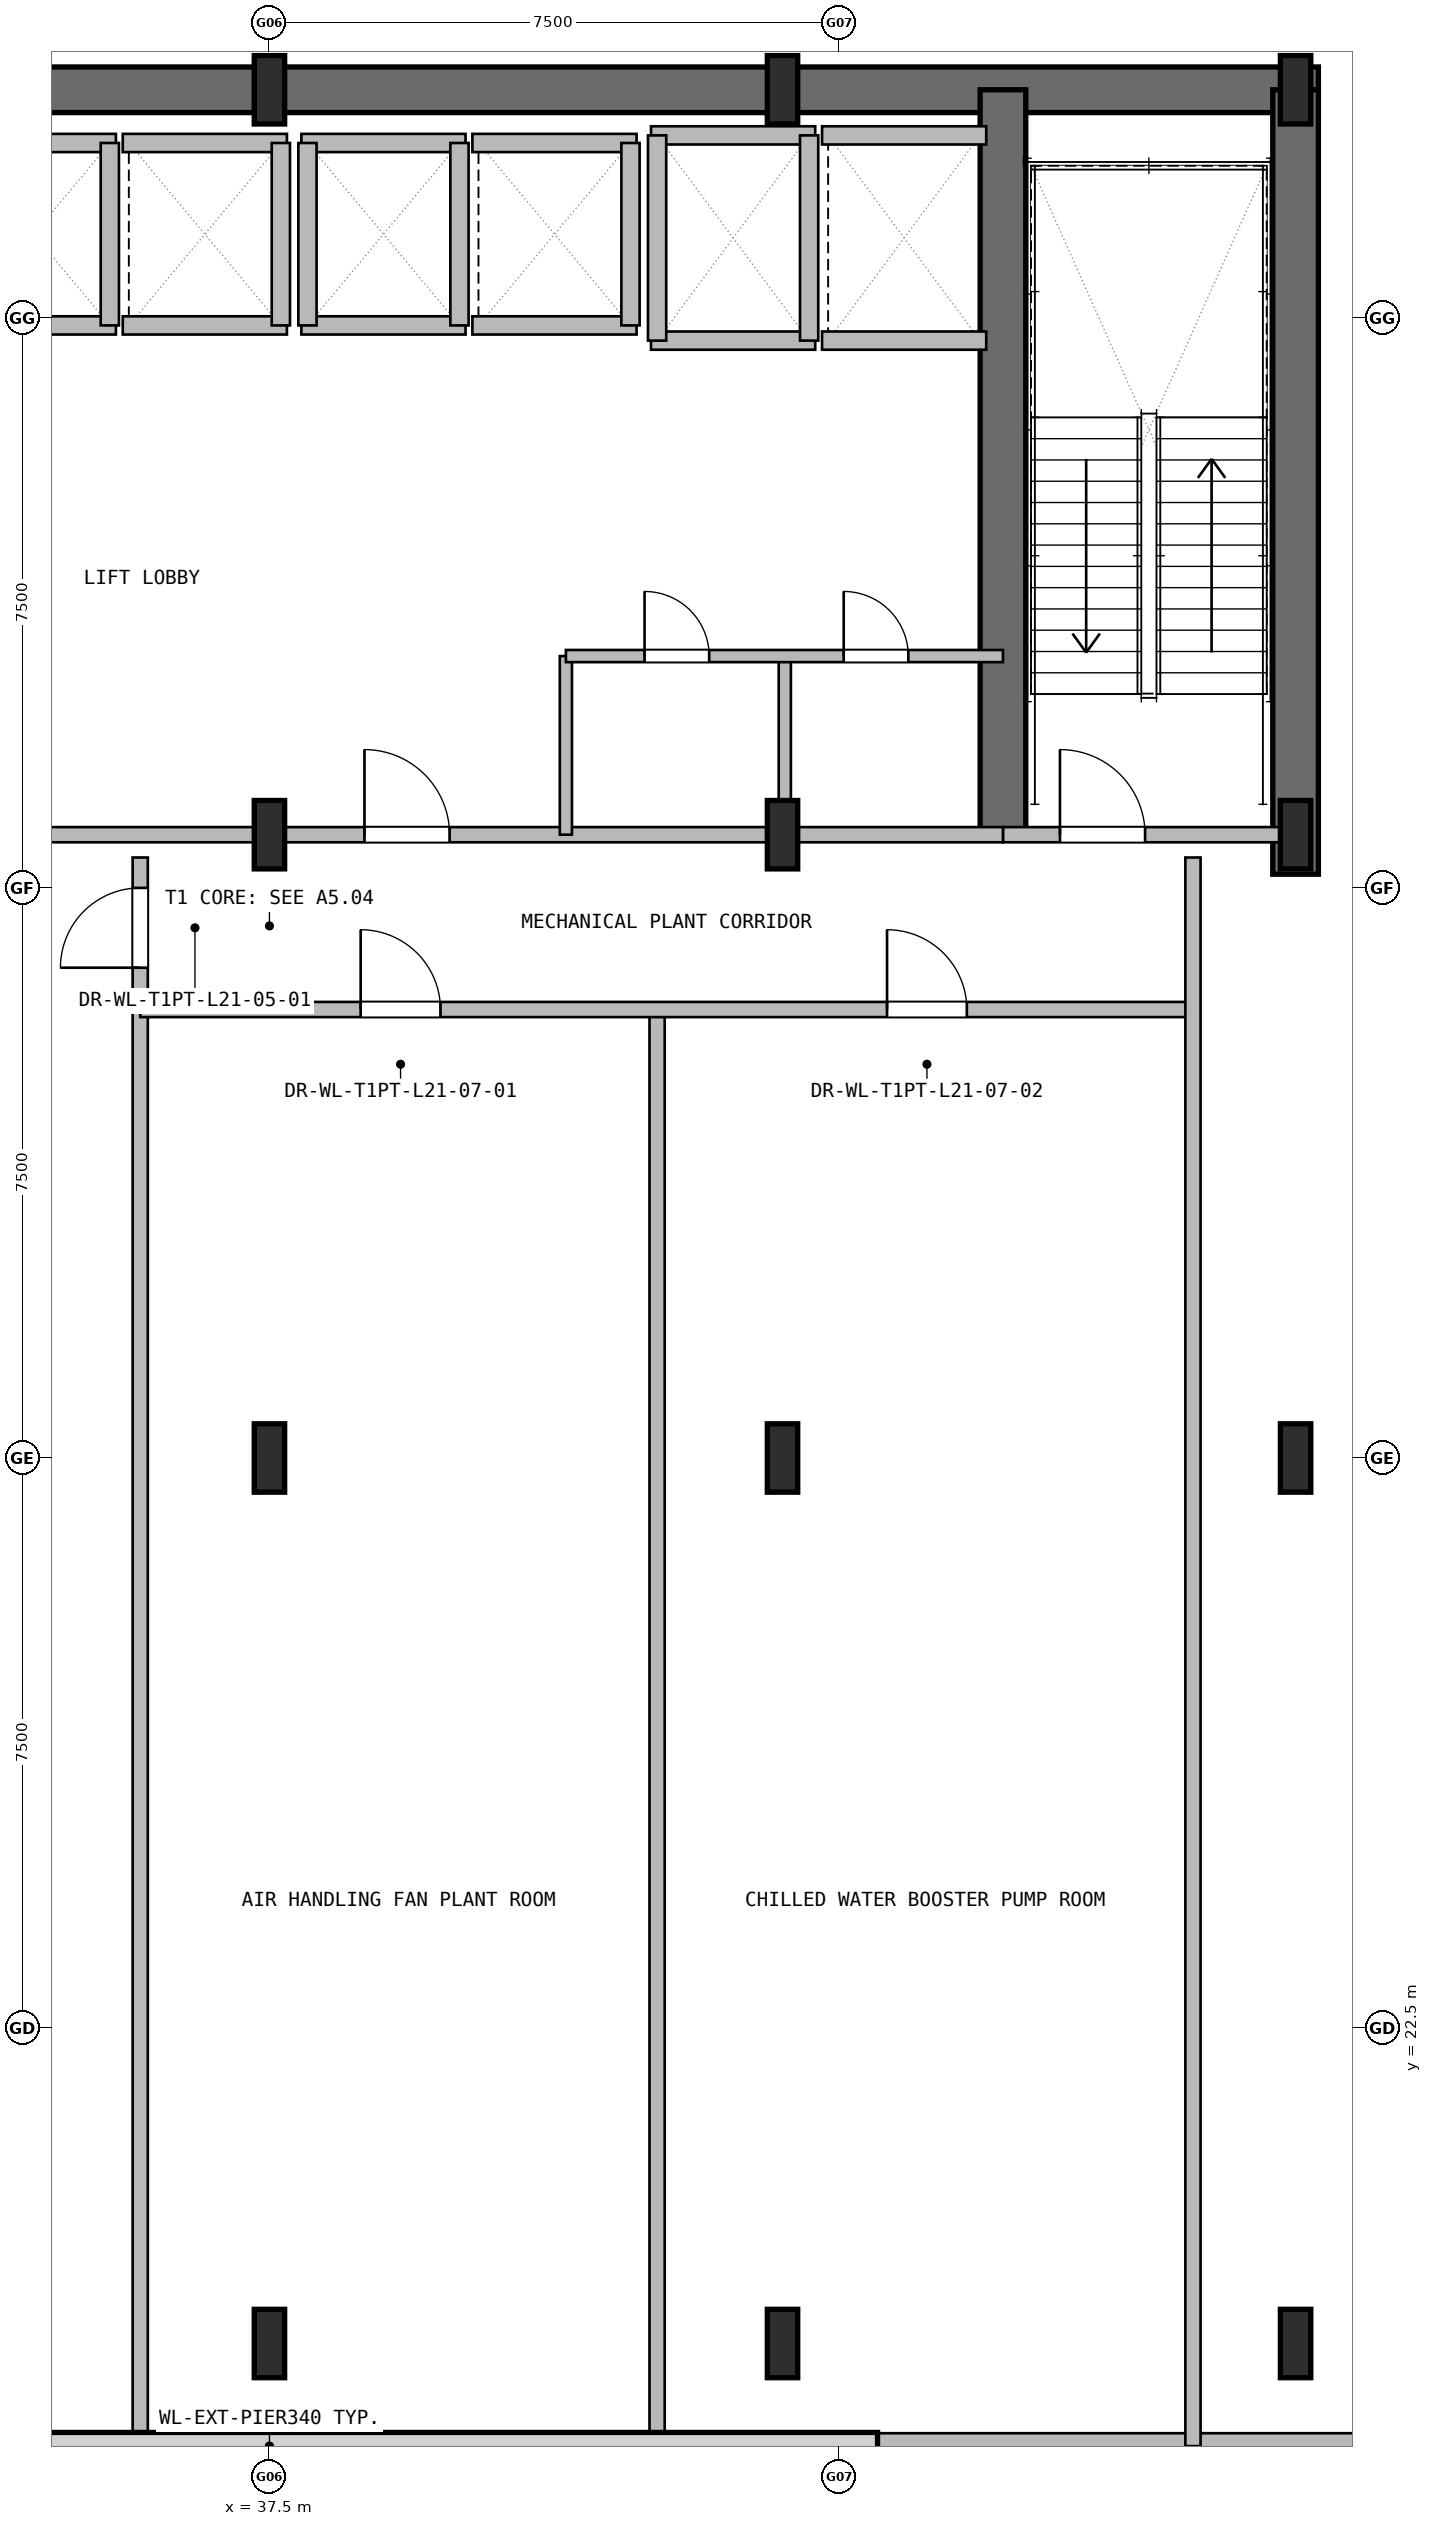
"""IFC4 building model, lengths in metres.
Left out: names, types, materials, properties, quantities, classifications, styles, units other than length and angle.
Written with IfcOpenShell. Run it as: python <this file> out.ifc"""

import sys

from ifc_helpers import new_model, si_unit, direction, frame, frame_2d, origin, origin_2d, place, context, subcontext, project, spatial, rectangle, i_section, extrude, element, fill, save


model = new_model("IFC4")
c1 = context("Model", 3, precision=1e-05, world=origin(), true_north=direction((0.0, 1.0)))
c2 = subcontext(c1, "Body", "Model", "MODEL_VIEW")
j1 = project(units=[si_unit("LENGTHUNIT", "METRE"), si_unit("PLANEANGLEUNIT", "RADIAN")], contexts=[c1])
p1 = place(None, origin())
s1 = spatial("IfcSite", under=j1, at=p1, CompositionType="ELEMENT")
p2 = place(p1, origin())
s2 = spatial("IfcBuilding", under=s1, at=p2, CompositionType="ELEMENT")
p3 = place(p2, frame((0.0, 0.0, 81.9)))
s3 = spatial("IfcBuildingStorey", under=s2, at=p3, CompositionType="ELEMENT", Elevation=81.9)
p4 = place(p3, frame((23.7, 48.0, 0.0), z_axis=(0.0, 0.0, 1.0), x_axis=(1.0, 0.0, 0.0)))
e1 = element("IfcWall", 1, at=p4, inside=s3, PredefinedType="SHEAR", context=c2, shape_type="SweptSolid", body=[
    extrude(rectangle(XDim=27.6, YDim=0.6, at=frame_2d((13.8, 0.0))), origin(), (0.0, 0.0, 1.0), 4.8),
])
p5 = place(p3, frame((51.0, 37.68, 0.0), z_axis=(0.0, 0.0, 1.0), x_axis=(0.0, 1.0, 0.0)))
e2 = element("IfcWall", 2, at=p5, inside=s3, PredefinedType="SHEAR", context=c2, shape_type="SweptSolid", body=[
    extrude(rectangle(XDim=10.32, YDim=0.6, at=frame_2d((5.16, 0.0))), origin(), (0.0, 0.0, 1.0), 4.8),
])
p6 = place(p3, frame((47.15, 38.2, 0.0), z_axis=(0.0, 0.0, 1.0), x_axis=(0.0, 1.0, 0.0)))
e3 = element("IfcWall", 3, at=p6, inside=s3, PredefinedType="SHEAR", context=c2, shape_type="SweptSolid", body=[
    extrude(rectangle(XDim=9.8, YDim=0.6, at=frame_2d((4.9, 0.0))), origin(), (0.0, 0.0, 1.0), 4.8),
])
for number, where, z_axis, x_axis in (
    (4, (37.5, 18.35, 0.0), (0.0, 0.0, 1.0), (1.0, 0.0, 0.0)),
    (5, (37.5, 30.0, 0.0), (0.0, 0.0, 1.0), (1.0, 0.0, 0.0)),
    (6, (37.5, 38.2, 0.0), (0.0, 0.0, 1.0), (1.0, 0.0, 0.0)),
    (7, (37.5, 48.0, 0.0), (0.0, 0.0, 1.0), (1.0, 0.0, 0.0)),
    (8, (44.25, 18.35, 0.0), (0.0, 0.0, 1.0), (1.0, 0.0, 0.0)),
    (9, (44.25, 30.0, 0.0), (0.0, 0.0, 1.0), (1.0, 0.0, 0.0)),
    (10, (44.25, 38.2, 0.0), (0.0, 0.0, 1.0), (1.0, 0.0, 0.0)),
    (11, (44.25, 48.0, 0.0), (0.0, 0.0, 1.0), (1.0, 0.0, 0.0)),
    (12, (51.0, 18.35, 0.0), (0.0, 0.0, 1.0), (1.0, 0.0, 0.0)),
    (13, (51.0, 30.0, 0.0), (0.0, 0.0, 1.0), (1.0, 0.0, 0.0)),
    (14, (51.0, 38.2, 0.0), (0.0, 0.0, 1.0), (1.0, 0.0, 0.0)),
    (15, (51.0, 48.0, 0.0), (0.0, 0.0, 1.0), (1.0, 0.0, 0.0)),
):
    element("IfcColumn", number, at=place(p3, frame(where, z_axis=z_axis, x_axis=x_axis)), inside=s3, PredefinedType="COLUMN", context=c2, shape_type="SweptSolid", body=[
        extrude(i_section(OverallWidth=0.4, OverallDepth=0.9, WebThickness=0.02, FlangeThickness=0.036, at=origin_2d()), origin(), (0.0, 0.0, 1.0), 4.8),
    ])
p7 = place(p3, frame((59.8, 17.0, 0.0), z_axis=(0.0, 0.0, 1.0), x_axis=(-1.0, 0.0, 0.0)))
e16 = element("IfcWall", 16, at=p7, inside=s3, PredefinedType="SOLIDWALL", context=c2, shape_type="SweptSolid", body=[
    extrude(rectangle(XDim=44.6, YDim=0.34, at=frame_2d((22.3, 0.0))), origin(), (0.0, 0.0, 1.0), 4.53),
])
p8 = place(p3, frame((47.15, 38.2, 0.0), z_axis=(0.0, 0.0, 1.0), x_axis=(1.0, 0.0, 0.0)))
e17 = element("IfcWall", 17, at=p8, inside=s3, PredefinedType="PARTITIONING", context=c2, shape_type="SweptSolid", body=[
    extrude(rectangle(XDim=3.85, YDim=0.2, at=frame_2d((1.925, 0.0))), origin(), (0.0, 0.0, 1.0), 3.83),
])
p9 = place(p8, frame((0.75, 0.0, 0.0)))
e18 = element("IfcOpeningElement", 18, at=p9, cuts=e17, PredefinedType="OPENING", context=c2, shape_type="SweptSolid", body=[
    extrude(rectangle(XDim=1.12, YDim=2.1, at=frame_2d((0.56, 1.05))), frame((0.0, 0.11, 0.0), z_axis=(0.0, -1.0, 0.0), x_axis=(1.0, 0.0, 0.0)), (0.0, 0.0, 1.0), 0.22),
])
p10 = place(p3, frame((30.8, 38.2, 0.0), z_axis=(0.0, 0.0, 1.0), x_axis=(1.0, 0.0, 0.0)))
e19 = element("IfcWall", 19, at=p10, inside=s3, PredefinedType="PARTITIONING", context=c2, shape_type="SweptSolid", body=[
    extrude(rectangle(XDim=16.35, YDim=0.2, at=frame_2d((8.175, 0.0))), origin(), (0.0, 0.0, 1.0), 3.83),
])
p11 = place(p10, frame((2.1, 0.0, 0.0)))
e20 = element("IfcOpeningElement", 20, at=p11, cuts=e19, PredefinedType="OPENING", context=c2, shape_type="SweptSolid", body=[
    extrude(rectangle(XDim=1.12, YDim=2.1, at=frame_2d((0.56, 1.05))), frame((0.0, 0.11, 0.0), z_axis=(0.0, -1.0, 0.0), x_axis=(1.0, 0.0, 0.0)), (0.0, 0.0, 1.0), 0.22),
])
p12 = place(p10, frame((7.95, 0.0, 0.0)))
e21 = element("IfcOpeningElement", 21, at=p12, cuts=e19, PredefinedType="OPENING", context=c2, shape_type="SweptSolid", body=[
    extrude(rectangle(XDim=1.12, YDim=2.1, at=frame_2d((0.56, 1.05))), frame((0.0, 0.11, 0.0), z_axis=(0.0, -1.0, 0.0), x_axis=(1.0, 0.0, 0.0)), (0.0, 0.0, 1.0), 0.22),
])
for number, where, z_axis, x_axis in (
    (22, (33.32, 44.9, 0.0), (0.0, 0.0, 1.0), (1.0, 0.0, 0.0)),
    (23, (33.32, 47.3, 0.0), (0.0, 0.0, 1.0), (1.0, 0.0, 0.0)),
):
    element("IfcWall", number, at=place(p3, frame(where, z_axis=z_axis, x_axis=x_axis)), inside=s3, PredefinedType="PARTITIONING", context=c2, shape_type="SweptSolid", body=[
        extrude(rectangle(XDim=2.16, YDim=0.24, at=frame_2d((1.08, 0.0))), origin(), (0.0, 0.0, 1.0), 4.53),
    ])
p13 = place(p3, frame((35.4, 44.9, 0.0), z_axis=(0.0, 0.0, 1.0), x_axis=(0.0, 1.0, 0.0)))
e24 = element("IfcWall", 24, at=p13, inside=s3, PredefinedType="PARTITIONING", context=c2, shape_type="SweptSolid", body=[
    extrude(rectangle(XDim=2.4, YDim=0.24, at=frame_2d((1.2, 0.0))), origin(), (0.0, 0.0, 1.0), 4.53),
])
for number, where, z_axis, x_axis in (
    (25, (35.57, 44.9, 0.0), (0.0, 0.0, 1.0), (1.0, 0.0, 0.0)),
    (26, (35.57, 47.3, 0.0), (0.0, 0.0, 1.0), (1.0, 0.0, 0.0)),
):
    element("IfcWall", number, at=place(p3, frame(where, z_axis=z_axis, x_axis=x_axis)), inside=s3, PredefinedType="PARTITIONING", context=c2, shape_type="SweptSolid", body=[
        extrude(rectangle(XDim=2.16, YDim=0.24, at=frame_2d((1.08, 0.0))), origin(), (0.0, 0.0, 1.0), 4.53),
    ])
p14 = place(p3, frame((37.65, 44.9, 0.0), z_axis=(0.0, 0.0, 1.0), x_axis=(0.0, 1.0, 0.0)))
e27 = element("IfcWall", 27, at=p14, inside=s3, PredefinedType="PARTITIONING", context=c2, shape_type="SweptSolid", body=[
    extrude(rectangle(XDim=2.4, YDim=0.24, at=frame_2d((1.2, 0.0))), origin(), (0.0, 0.0, 1.0), 4.53),
])
for number, where, z_axis, x_axis in (
    (28, (37.92, 44.9, 0.0), (0.0, 0.0, 1.0), (1.0, 0.0, 0.0)),
    (29, (37.92, 47.3, 0.0), (0.0, 0.0, 1.0), (1.0, 0.0, 0.0)),
):
    element("IfcWall", number, at=place(p3, frame(where, z_axis=z_axis, x_axis=x_axis)), inside=s3, PredefinedType="PARTITIONING", context=c2, shape_type="SweptSolid", body=[
        extrude(rectangle(XDim=2.16, YDim=0.24, at=frame_2d((1.08, 0.0))), origin(), (0.0, 0.0, 1.0), 4.53),
    ])
for number, where, z_axis, x_axis in (
    (30, (38.0, 44.9, 0.0), (0.0, 0.0, 1.0), (0.0, 1.0, 0.0)),
    (31, (40.0, 44.9, 0.0), (0.0, 0.0, 1.0), (0.0, 1.0, 0.0)),
):
    element("IfcWall", number, at=place(p3, frame(where, z_axis=z_axis, x_axis=x_axis)), inside=s3, PredefinedType="PARTITIONING", context=c2, shape_type="SweptSolid", body=[
        extrude(rectangle(XDim=2.4, YDim=0.24, at=frame_2d((1.2, 0.0))), origin(), (0.0, 0.0, 1.0), 4.53),
    ])
for number, where, z_axis, x_axis in (
    (32, (40.17, 44.9, 0.0), (0.0, 0.0, 1.0), (1.0, 0.0, 0.0)),
    (33, (40.17, 47.3, 0.0), (0.0, 0.0, 1.0), (1.0, 0.0, 0.0)),
):
    element("IfcWall", number, at=place(p3, frame(where, z_axis=z_axis, x_axis=x_axis)), inside=s3, PredefinedType="PARTITIONING", context=c2, shape_type="SweptSolid", body=[
        extrude(rectangle(XDim=2.16, YDim=0.24, at=frame_2d((1.08, 0.0))), origin(), (0.0, 0.0, 1.0), 4.53),
    ])
p15 = place(p3, frame((42.25, 44.9, 0.0), z_axis=(0.0, 0.0, 1.0), x_axis=(0.0, 1.0, 0.0)))
e34 = element("IfcWall", 34, at=p15, inside=s3, PredefinedType="PARTITIONING", context=c2, shape_type="SweptSolid", body=[
    extrude(rectangle(XDim=2.4, YDim=0.24, at=frame_2d((1.2, 0.0))), origin(), (0.0, 0.0, 1.0), 4.53),
])
for number, where, z_axis, x_axis in (
    (35, (42.52, 44.7, 0.0), (0.0, 0.0, 1.0), (1.0, 0.0, 0.0)),
    (36, (42.52, 47.4, 0.0), (0.0, 0.0, 1.0), (1.0, 0.0, 0.0)),
):
    element("IfcWall", number, at=place(p3, frame(where, z_axis=z_axis, x_axis=x_axis)), inside=s3, PredefinedType="PARTITIONING", context=c2, shape_type="SweptSolid", body=[
        extrude(rectangle(XDim=2.16, YDim=0.24, at=frame_2d((1.08, 0.0))), origin(), (0.0, 0.0, 1.0), 4.53),
    ])
for number, where, z_axis, x_axis in (
    (37, (42.6, 44.7, 0.0), (0.0, 0.0, 1.0), (0.0, 1.0, 0.0)),
    (38, (44.6, 44.7, 0.0), (0.0, 0.0, 1.0), (0.0, 1.0, 0.0)),
):
    element("IfcWall", number, at=place(p3, frame(where, z_axis=z_axis, x_axis=x_axis)), inside=s3, PredefinedType="PARTITIONING", context=c2, shape_type="SweptSolid", body=[
        extrude(rectangle(XDim=2.7, YDim=0.24, at=frame_2d((1.35, 0.0))), origin(), (0.0, 0.0, 1.0), 4.53),
    ])
for number, where, z_axis, x_axis in (
    (39, (44.77, 44.7, 0.0), (0.0, 0.0, 1.0), (1.0, 0.0, 0.0)),
    (40, (44.77, 47.4, 0.0), (0.0, 0.0, 1.0), (1.0, 0.0, 0.0)),
):
    element("IfcWall", number, at=place(p3, frame(where, z_axis=z_axis, x_axis=x_axis)), inside=s3, PredefinedType="PARTITIONING", context=c2, shape_type="SweptSolid", body=[
        extrude(rectangle(XDim=2.16, YDim=0.24, at=frame_2d((1.08, 0.0))), origin(), (0.0, 0.0, 1.0), 4.53),
    ])
for number, where, z_axis, x_axis in (
    (41, (41.4, 38.2, 0.0), (0.0, 0.0, 1.0), (0.0, 1.0, 0.0)),
    (42, (44.28, 38.2, 0.0), (0.0, 0.0, 1.0), (0.0, 1.0, 0.0)),
):
    element("IfcWall", number, at=place(p3, frame(where, z_axis=z_axis, x_axis=x_axis)), inside=s3, PredefinedType="PARTITIONING", context=c2, shape_type="SweptSolid", body=[
        extrude(rectangle(XDim=2.35, YDim=0.16, at=frame_2d((1.175, 0.0))), origin(), (0.0, 0.0, 1.0), 4.53),
    ])
p16 = place(p3, frame((41.4, 40.55, 0.0), z_axis=(0.0, 0.0, 1.0), x_axis=(1.0, 0.0, 0.0)))
e43 = element("IfcWall", 43, at=p16, inside=s3, PredefinedType="PARTITIONING", context=c2, shape_type="SweptSolid", body=[
    extrude(rectangle(XDim=5.75, YDim=0.16, at=frame_2d((2.875, 0.0))), origin(), (0.0, 0.0, 1.0), 4.53),
])
p17 = place(p16, frame((1.035, 0.0, 0.0)))
e44 = element("IfcOpeningElement", 44, at=p17, cuts=e43, PredefinedType="OPENING", context=c2, shape_type="SweptSolid", body=[
    extrude(rectangle(XDim=0.85, YDim=2.05, at=frame_2d((0.425, 1.025))), frame((0.0, 0.09, 0.0), z_axis=(0.0, -1.0, 0.0), x_axis=(1.0, 0.0, 0.0)), (0.0, 0.0, 1.0), 0.18),
])
p18 = place(p16, frame((3.655, 0.0, 0.0)))
e45 = element("IfcOpeningElement", 45, at=p18, cuts=e43, PredefinedType="OPENING", context=c2, shape_type="SweptSolid", body=[
    extrude(rectangle(XDim=0.85, YDim=2.05, at=frame_2d((0.425, 1.025))), frame((0.0, 0.09, 0.0), z_axis=(0.0, -1.0, 0.0), x_axis=(1.0, 0.0, 0.0)), (0.0, 0.0, 1.0), 0.18),
])
p19 = place(p3, frame((35.8, 17.0, 0.0), z_axis=(0.0, 0.0, 1.0), x_axis=(0.0, 1.0, 0.0)))
e46 = element("IfcWall", 46, at=p19, inside=s3, PredefinedType="PARTITIONING", context=c2, shape_type="SweptSolid", body=[
    extrude(rectangle(XDim=20.9, YDim=0.2, at=frame_2d((10.45, 0.0))), origin(), (0.0, 0.0, 1.0), 4.53),
])
p20 = place(p19, frame((19.45, 0.0, 0.0)))
e47 = element("IfcOpeningElement", 47, at=p20, cuts=e46, PredefinedType="OPENING", context=c2, shape_type="SweptSolid", body=[
    extrude(rectangle(XDim=1.05, YDim=2.1, at=frame_2d((0.525, 1.05))), frame((0.0, 0.11, 0.0), z_axis=(0.0, -1.0, 0.0), x_axis=(1.0, 0.0, 0.0)), (0.0, 0.0, 1.0), 0.22),
])
p21 = place(p3, frame((42.6, 17.0, 0.0), z_axis=(0.0, 0.0, 1.0), x_axis=(0.0, 1.0, 0.0)))
e48 = element("IfcWall", 48, at=p21, inside=s3, PredefinedType="PARTITIONING", context=c2, shape_type="SweptSolid", body=[
    extrude(rectangle(XDim=18.9, YDim=0.2, at=frame_2d((9.45, 0.0))), origin(), (0.0, 0.0, 1.0), 4.53),
])
p22 = place(p3, frame((35.8, 35.9, 0.0), z_axis=(0.0, 0.0, 1.0), x_axis=(1.0, 0.0, 0.0)))
e49 = element("IfcWall", 49, at=p22, inside=s3, PredefinedType="PARTITIONING", context=c2, shape_type="SweptSolid", body=[
    extrude(rectangle(XDim=13.85, YDim=0.2, at=frame_2d((6.925, 0.0))), origin(), (0.0, 0.0, 1.0), 4.53),
])
p23 = place(p22, frame((2.9, 0.0, 0.0)))
e50 = element("IfcOpeningElement", 50, at=p23, cuts=e49, PredefinedType="OPENING", context=c2, shape_type="SweptSolid", body=[
    extrude(rectangle(XDim=1.05, YDim=2.1, at=frame_2d((0.525, 1.05))), frame((0.0, 0.11, 0.0), z_axis=(0.0, -1.0, 0.0), x_axis=(1.0, 0.0, 0.0)), (0.0, 0.0, 1.0), 0.22),
])
p24 = place(p22, frame((9.825, 0.0, 0.0)))
e51 = element("IfcOpeningElement", 51, at=p24, cuts=e49, PredefinedType="OPENING", context=c2, shape_type="SweptSolid", body=[
    extrude(rectangle(XDim=1.05, YDim=2.1, at=frame_2d((0.525, 1.05))), frame((0.0, 0.11, 0.0), z_axis=(0.0, -1.0, 0.0), x_axis=(1.0, 0.0, 0.0)), (0.0, 0.0, 1.0), 0.22),
])
p25 = place(p3, frame((49.65, 17.0, 0.0), z_axis=(0.0, 0.0, 1.0), x_axis=(0.0, 1.0, 0.0)))
e52 = element("IfcWall", 52, at=p25, inside=s3, PredefinedType="PARTITIONING", context=c2, shape_type="SweptSolid", body=[
    extrude(rectangle(XDim=20.9, YDim=0.2, at=frame_2d((10.45, 0.0))), origin(), (0.0, 0.0, 1.0), 4.53),
])
p26 = place(p9, origin())
e53 = element("IfcDoor", 53, at=p26, inside=s3, OperationType="SINGLE_SWING_RIGHT", PredefinedType="DOOR", context=c2, shape_type="SweptSolid", body=[
    extrude(rectangle(XDim=1.12, YDim=2.1, at=frame_2d((0.56, 1.05))), frame((0.0, 0.025, 0.0), z_axis=(0.0, -1.0, 0.0), x_axis=(1.0, 0.0, 0.0)), (0.0, 0.0, 1.0), 0.05),
])
fill(e18, e53)
p27 = place(p12, origin())
e54 = element("IfcDoor", 54, at=p27, inside=s3, OperationType="SINGLE_SWING_RIGHT", PredefinedType="DOOR", context=c2, shape_type="SweptSolid", body=[
    extrude(rectangle(XDim=1.12, YDim=2.1, at=frame_2d((0.56, 1.05))), frame((0.0, 0.025, 0.0), z_axis=(0.0, -1.0, 0.0), x_axis=(1.0, 0.0, 0.0)), (0.0, 0.0, 1.0), 0.05),
])
fill(e21, e54)
p28 = place(p17, origin())
e55 = element("IfcDoor", 55, at=p28, inside=s3, OperationType="SINGLE_SWING_RIGHT", PredefinedType="DOOR", context=c2, shape_type="SweptSolid", body=[
    extrude(rectangle(XDim=0.85, YDim=2.05, at=frame_2d((0.425, 1.025))), frame((0.0, 0.025, 0.0), z_axis=(0.0, -1.0, 0.0), x_axis=(1.0, 0.0, 0.0)), (0.0, 0.0, 1.0), 0.05),
])
fill(e44, e55)
p29 = place(p18, origin())
e56 = element("IfcDoor", 56, at=p29, inside=s3, OperationType="SINGLE_SWING_LEFT", PredefinedType="DOOR", context=c2, shape_type="SweptSolid", body=[
    extrude(rectangle(XDim=0.85, YDim=2.05, at=frame_2d((0.425, 1.025))), frame((0.0, 0.025, 0.0), z_axis=(0.0, -1.0, 0.0), x_axis=(1.0, 0.0, 0.0)), (0.0, 0.0, 1.0), 0.05),
])
fill(e45, e56)
p30 = place(p20, origin())
e57 = element("IfcDoor", 57, at=p30, inside=s3, OperationType="SINGLE_SWING_LEFT", PredefinedType="DOOR", context=c2, shape_type="SweptSolid", body=[
    extrude(rectangle(XDim=1.05, YDim=2.1, at=frame_2d((0.525, 1.05))), frame((0.0, 0.025, 0.0), z_axis=(0.0, -1.0, 0.0), x_axis=(1.0, 0.0, 0.0)), (0.0, 0.0, 1.0), 0.05),
])
fill(e47, e57)
p31 = place(p23, origin())
e58 = element("IfcDoor", 58, at=p31, inside=s3, OperationType="SINGLE_SWING_RIGHT", PredefinedType="DOOR", context=c2, shape_type="SweptSolid", body=[
    extrude(rectangle(XDim=1.05, YDim=2.1, at=frame_2d((0.525, 1.05))), frame((0.0, 0.025, 0.0), z_axis=(0.0, -1.0, 0.0), x_axis=(1.0, 0.0, 0.0)), (0.0, 0.0, 1.0), 0.05),
])
fill(e50, e58)
p32 = place(p24, origin())
e59 = element("IfcDoor", 59, at=p32, inside=s3, OperationType="SINGLE_SWING_LEFT", PredefinedType="DOOR", context=c2, shape_type="SweptSolid", body=[
    extrude(rectangle(XDim=1.05, YDim=2.1, at=frame_2d((0.525, 1.05))), frame((0.0, 0.025, 0.0), z_axis=(0.0, -1.0, 0.0), x_axis=(1.0, 0.0, 0.0)), (0.0, 0.0, 1.0), 0.05),
])
fill(e51, e59)
save(model, sys.argv[1])
